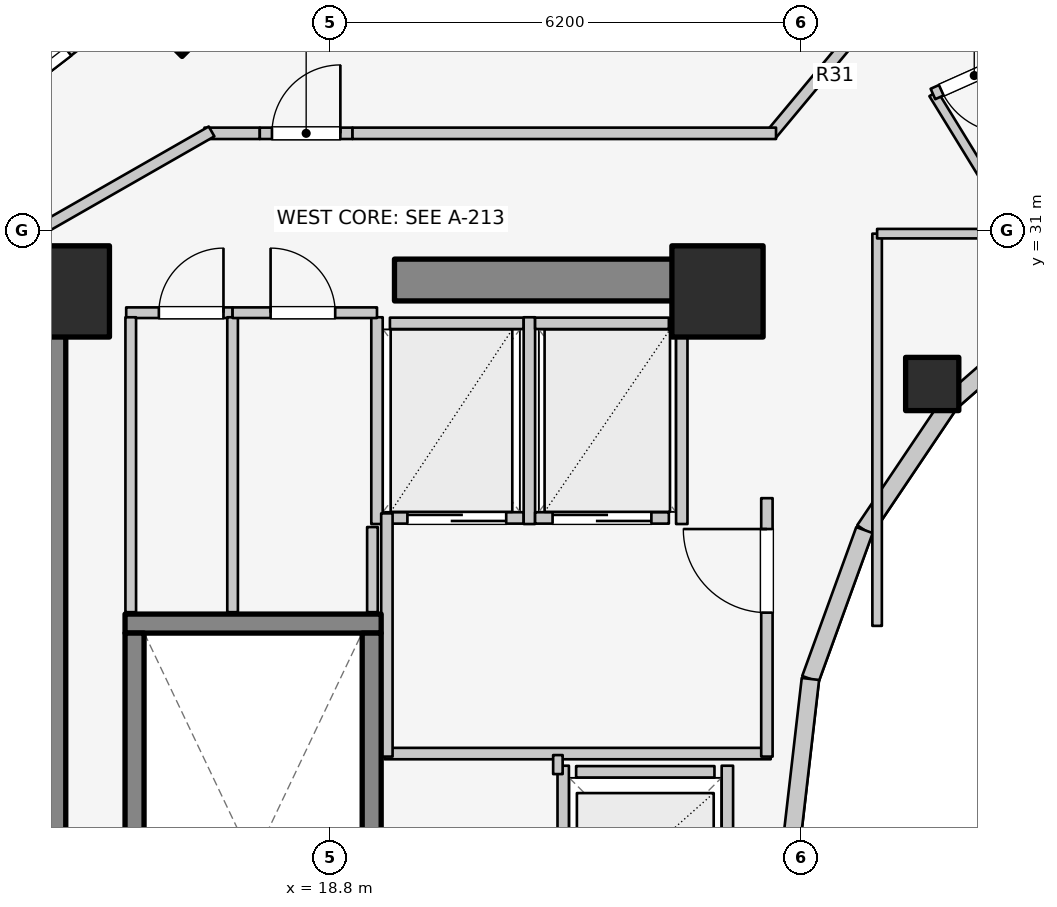
"""IFC4 building model, lengths in metres.
Left out: names, types, materials, properties, quantities, classifications, styles, units other than length and angle.
Written with IfcOpenShell. Run it as: python <this file> out.ifc"""

import sys

from ifc_helpers import new_model, si_unit, direction, frame, frame_2d, origin, origin_2d, place, context, subcontext, project, spatial, rectangle, extrude, element, fill, save


model = new_model("IFC4")
c1 = context("Model", 3, precision=1e-05, world=origin(), true_north=direction((0.0, 1.0)))
c2 = subcontext(c1, "Body", "Model", "MODEL_VIEW")
j1 = project(units=[si_unit("LENGTHUNIT", "METRE"), si_unit("PLANEANGLEUNIT", "RADIAN")], contexts=[c1])
p1 = place(None, origin())
s1 = spatial("IfcSite", under=j1, at=p1, CompositionType="ELEMENT")
p2 = place(p1, origin())
s2 = spatial("IfcBuilding", under=s1, at=p2, CompositionType="ELEMENT")
p3 = place(p2, frame((0.0, 0.0, 217.1)))
s3 = spatial("IfcBuildingStorey", under=s2, at=p3, CompositionType="ELEMENT", Elevation=217.1)
p4 = place(p3, frame((15.05, 17.05, 0.0), z_axis=(0.0, 0.0, 1.0), x_axis=(0.0, 1.0, 0.0)))
e1 = element("IfcWall", 1, at=p4, inside=s3, PredefinedType="SHEAR", context=c2, shape_type="SweptSolid", body=[
    extrude(rectangle(XDim=12.8, YDim=0.55, at=frame_2d((6.4, 0.0))), origin(), (0.0, 0.0, 1.0), 3.1),
])
p5 = place(p3, frame((19.65, 30.35, 0.0), z_axis=(0.0, 0.0, 1.0), x_axis=(1.0, 0.0, 0.0)))
e2 = element("IfcWall", 2, at=p5, inside=s3, PredefinedType="SHEAR", context=c2, shape_type="SweptSolid", body=[
    extrude(rectangle(XDim=4.5, YDim=0.55, at=frame_2d((2.25, 0.0))), origin(), (0.0, 0.0, 1.0), 3.1),
])
p6 = place(p3, frame((16.105, 25.83, 0.0), z_axis=(0.0, 0.0, 1.0), x_axis=(1.0, 0.0, 0.0)))
e3 = element("IfcWall", 3, at=p6, inside=s3, PredefinedType="SOLIDWALL", context=c2, shape_type="SweptSolid", body=[
    extrude(rectangle(XDim=3.37, YDim=0.25, at=frame_2d((1.685, 0.0))), origin(), (0.0, 0.0, 1.0), 3.1),
])
for number, where, z_axis, x_axis in (
    (4, (16.23, 17.895, 0.0), (0.0, 0.0, 1.0), (0.0, 1.0, 0.0)),
    (5, (19.35, 17.895, 0.0), (0.0, 0.0, 1.0), (0.0, 1.0, 0.0)),
):
    element("IfcWall", number, at=place(p3, frame(where, z_axis=z_axis, x_axis=x_axis)), inside=s3, PredefinedType="SOLIDWALL", context=c2, shape_type="SweptSolid", body=[
        extrude(rectangle(XDim=7.81, YDim=0.25, at=frame_2d((3.905, 0.0))), origin(), (0.0, 0.0, 1.0), 3.1),
    ])
for number, where, z_axis, x_axis in (
    (6, (23.9, 30.2, 0.0), (0.0, 0.0, 1.0), (1.0, 0.0, 0.0)),
    (7, (15.3, 30.2, 0.0), (0.0, 0.0, 1.0), (1.0, 0.0, 0.0)),
):
    element("IfcColumn", number, at=place(p3, frame(where, z_axis=z_axis, x_axis=x_axis)), inside=s3, PredefinedType="COLUMN", context=c2, shape_type="SweptSolid", body=[
        extrude(rectangle(XDim=1.2, YDim=1.2, at=origin_2d()), origin(), (0.0, 0.0, 1.0), 3.1),
    ])
p7 = place(p3, frame((26.725, 28.982, 0.0), z_axis=(0.0, 0.0, 1.0), x_axis=(1.0, 0.0, 0.0)))
e8 = element("IfcColumn", 8, at=p7, inside=s3, PredefinedType="COLUMN", context=c2, shape_type="SweptSolid", body=[
    extrude(rectangle(XDim=0.7, YDim=0.7, at=origin_2d()), origin(), (0.0, 0.0, 1.0), 3.1),
])
p8 = place(p3, frame((16.855, 33.857, 0.0), z_axis=(0.0, 0.0, 1.0), x_axis=(-0.707106781187, 0.707106781187, 0.0)))
e9 = element("IfcColumn", 9, at=p8, inside=s3, PredefinedType="COLUMN", context=c2, shape_type="SweptSolid", body=[
    extrude(rectangle(XDim=0.8, YDim=0.8, at=origin_2d()), origin(), (0.0, 0.0, 1.0), 3.1),
])
p9 = place(p3, frame((28.44, 30.032, 0.0), z_axis=(0.0, 0.0, 1.0), x_axis=(-0.752576694707, -0.658504607869, 0.0)))
e10 = element("IfcWall", 10, at=p9, inside=s3, PredefinedType="STANDARD", context=c2, shape_type="SweptSolid", body=[
    extrude(rectangle(XDim=1.959, YDim=0.23, at=frame_2d((0.98, 0.0))), origin(), (0.0, 0.0, 1.0), 1.22),
])
p10 = place(p3, frame((26.965, 28.742, 0.0), z_axis=(0.0, 0.0, 1.0), x_axis=(-0.558197800898, -0.829707909492, 0.0)))
e11 = element("IfcWall", 11, at=p10, inside=s3, PredefinedType="STANDARD", context=c2, shape_type="SweptSolid", body=[
    extrude(rectangle(XDim=2.027, YDim=0.23, at=frame_2d((1.013, 0.0))), origin(), (0.0, 0.0, 1.0), 1.22),
])
p11 = place(p3, frame((25.834, 27.06, 0.0), z_axis=(0.0, 0.0, 1.0), x_axis=(-0.341423187295, -0.93990968033, 0.0)))
e12 = element("IfcWall", 12, at=p11, inside=s3, PredefinedType="STANDARD", context=c2, shape_type="SweptSolid", body=[
    extrude(rectangle(XDim=2.084, YDim=0.23, at=frame_2d((1.042, 0.0))), origin(), (0.0, 0.0, 1.0), 2.56),
])
p12 = place(p3, frame((25.123, 25.102, 0.0), z_axis=(0.0, 0.0, 1.0), x_axis=(-0.114711713601, -0.993398823617, 0.0)))
e13 = element("IfcWall", 13, at=p12, inside=s3, PredefinedType="STANDARD", context=c2, shape_type="SweptSolid", body=[
    extrude(rectangle(XDim=2.115, YDim=0.23, at=frame_2d((1.058, 0.0))), origin(), (0.0, 0.0, 1.0), 2.56),
])
p13 = place(p3, frame((16.442, 34.272, 0.0), z_axis=(0.0, 0.0, 1.0), x_axis=(-0.792713817907, -0.609593965603, 0.0)))
e14 = element("IfcWall", 14, at=p13, inside=s3, PredefinedType="STANDARD", context=c2, shape_type="SweptSolid", body=[
    extrude(rectangle(XDim=4.041, YDim=0.26, at=frame_2d((2.021, 0.0))), origin(), (0.0, 0.0, 1.0), 1.22),
])
p14 = place(p13, frame((1.42, 0.0, 0.15)))
e15 = element("IfcOpeningElement", 15, at=p14, cuts=e14, PredefinedType="OPENING", context=c2, shape_type="SweptSolid", body=[
    extrude(rectangle(XDim=1.2, YDim=0.9, at=frame_2d((0.6, 0.45))), frame((0.0, 0.14, 0.0), z_axis=(0.0, -1.0, 0.0), x_axis=(1.0, 0.0, 0.0)), (0.0, 0.0, 1.0), 0.28),
])
p15 = place(p3, frame((22.04, 23.88, 0.0), z_axis=(0.0, 0.0, 1.0), x_axis=(1.0, 0.0, 0.0)))
e16 = element("IfcWall", 16, at=p15, inside=s3, PredefinedType="SOLIDWALL", context=c2, shape_type="SweptSolid", body=[
    extrude(rectangle(XDim=1.82, YDim=0.15, at=frame_2d((0.91, 0.0))), origin(), (0.0, 0.0, 1.0), 2.12),
])
p16 = place(p3, frame((21.87, 21.64, 0.0), z_axis=(0.0, 0.0, 1.0), x_axis=(0.0, 1.0, 0.0)))
e17 = element("IfcWall", 17, at=p16, inside=s3, PredefinedType="SOLIDWALL", context=c2, shape_type="SweptSolid", body=[
    extrude(rectangle(XDim=2.32, YDim=0.15, at=frame_2d((1.16, 0.0))), origin(), (0.0, 0.0, 1.0), 2.575),
])
p17 = place(p3, frame((24.03, 21.64, 0.0), z_axis=(0.0, 0.0, 1.0), x_axis=(0.0, 1.0, 0.0)))
e18 = element("IfcWall", 18, at=p17, inside=s3, PredefinedType="SOLIDWALL", context=c2, shape_type="SweptSolid", body=[
    extrude(rectangle(XDim=2.32, YDim=0.15, at=frame_2d((1.16, 0.0))), origin(), (0.0, 0.0, 1.0), 2.12),
])
p18 = place(p3, frame((19.59, 27.22, 0.0), z_axis=(0.0, 0.0, 1.0), x_axis=(1.0, 0.0, 0.0)))
e19 = element("IfcWall", 19, at=p18, inside=s3, PredefinedType="SOLIDWALL", context=c2, shape_type="SweptSolid", body=[
    extrude(rectangle(XDim=1.76, YDim=0.15, at=frame_2d((0.88, 0.0))), origin(), (0.0, 0.0, 1.0), 2.575),
])
p19 = place(p18, frame((0.23, 0.0, 0.0)))
e20 = element("IfcOpeningElement", 20, at=p19, cuts=e19, PredefinedType="OPENING", context=c2, shape_type="SweptSolid", body=[
    extrude(rectangle(XDim=1.3, YDim=2.1, at=frame_2d((0.65, 1.05))), frame((0.0, 0.085, 0.0), z_axis=(0.0, -1.0, 0.0), x_axis=(1.0, 0.0, 0.0)), (0.0, 0.0, 1.0), 0.17),
])
p20 = place(p3, frame((19.59, 29.78, 0.0), z_axis=(0.0, 0.0, 1.0), x_axis=(1.0, 0.0, 0.0)))
e21 = element("IfcWall", 21, at=p20, inside=s3, PredefinedType="SOLIDWALL", context=c2, shape_type="SweptSolid", body=[
    extrude(rectangle(XDim=1.76, YDim=0.15, at=frame_2d((0.88, 0.0))), origin(), (0.0, 0.0, 1.0), 2.575),
])
for number, where, z_axis, x_axis in (
    (22, (19.42, 27.14, 0.0), (0.0, 0.0, 1.0), (0.0, 1.0, 0.0)),
    (23, (21.425, 27.14, 0.0), (0.0, 0.0, 1.0), (0.0, 1.0, 0.0)),
):
    element("IfcWall", number, at=place(p3, frame(where, z_axis=z_axis, x_axis=x_axis)), inside=s3, PredefinedType="SOLIDWALL", context=c2, shape_type="SweptSolid", body=[
        extrude(rectangle(XDim=2.72, YDim=0.15, at=frame_2d((1.36, 0.0))), origin(), (0.0, 0.0, 1.0), 2.575),
    ])
p21 = place(p3, frame((21.5, 27.22, 0.0), z_axis=(0.0, 0.0, 1.0), x_axis=(1.0, 0.0, 0.0)))
e24 = element("IfcWall", 24, at=p21, inside=s3, PredefinedType="SOLIDWALL", context=c2, shape_type="SweptSolid", body=[
    extrude(rectangle(XDim=1.76, YDim=0.15, at=frame_2d((0.88, 0.0))), origin(), (0.0, 0.0, 1.0), 2.575),
])
p22 = place(p21, frame((0.23, 0.0, 0.0)))
e25 = element("IfcOpeningElement", 25, at=p22, cuts=e24, PredefinedType="OPENING", context=c2, shape_type="SweptSolid", body=[
    extrude(rectangle(XDim=1.3, YDim=2.1, at=frame_2d((0.65, 1.05))), frame((0.0, 0.085, 0.0), z_axis=(0.0, -1.0, 0.0), x_axis=(1.0, 0.0, 0.0)), (0.0, 0.0, 1.0), 0.17),
])
p23 = place(p3, frame((21.5, 29.78, 0.0), z_axis=(0.0, 0.0, 1.0), x_axis=(1.0, 0.0, 0.0)))
e26 = element("IfcWall", 26, at=p23, inside=s3, PredefinedType="SOLIDWALL", context=c2, shape_type="SweptSolid", body=[
    extrude(rectangle(XDim=1.76, YDim=0.15, at=frame_2d((0.88, 0.0))), origin(), (0.0, 0.0, 1.0), 2.575),
])
p24 = place(p3, frame((23.43, 27.14, 0.0), z_axis=(0.0, 0.0, 1.0), x_axis=(0.0, 1.0, 0.0)))
e27 = element("IfcWall", 27, at=p24, inside=s3, PredefinedType="SOLIDWALL", context=c2, shape_type="SweptSolid", body=[
    extrude(rectangle(XDim=2.72, YDim=0.15, at=frame_2d((1.36, 0.0))), origin(), (0.0, 0.0, 1.0), 2.575),
])
p25 = place(p3, frame((19.52, 24.12, 0.0), z_axis=(0.0, 0.0, 1.0), x_axis=(1.0, 0.0, 0.0)))
e28 = element("IfcWall", 28, at=p25, inside=s3, PredefinedType="PARTITIONING", context=c2, shape_type="SweptSolid", body=[
    extrude(rectangle(XDim=5.08, YDim=0.15, at=frame_2d((2.54, 0.0))), origin(), (0.0, 0.0, 1.0), 2.12),
])
p26 = place(p3, frame((19.55, 24.08, 0.0), z_axis=(0.0, 0.0, 1.0), x_axis=(0.0, 1.0, 0.0)))
e29 = element("IfcWall", 29, at=p26, inside=s3, PredefinedType="PARTITIONING", context=c2, shape_type="SweptSolid", body=[
    extrude(rectangle(XDim=3.2, YDim=0.15, at=frame_2d((1.6, 0.0))), origin(), (0.0, 0.0, 1.0), 2.575),
])
p27 = place(p3, frame((24.55, 24.08, 0.0), z_axis=(0.0, 0.0, 1.0), x_axis=(0.0, 1.0, 0.0)))
e30 = element("IfcWall", 30, at=p27, inside=s3, PredefinedType="PARTITIONING", context=c2, shape_type="SweptSolid", body=[
    extrude(rectangle(XDim=3.4, YDim=0.15, at=frame_2d((1.7, 0.0))), origin(), (0.0, 0.0, 1.0), 2.575),
])
p28 = place(p27, frame((1.894, 0.0, 0.0)))
e31 = element("IfcOpeningElement", 31, at=p28, cuts=e30, PredefinedType="OPENING", context=c2, shape_type="SweptSolid", body=[
    extrude(rectangle(XDim=1.1, YDim=2.1, at=frame_2d((0.55, 1.05))), frame((0.0, 0.085, 0.0), z_axis=(0.0, -1.0, 0.0), x_axis=(1.0, 0.0, 0.0)), (0.0, 0.0, 1.0), 0.17),
])
p29 = place(p3, frame((21.8, 23.85, 0.0), z_axis=(0.0, 0.0, 1.0), x_axis=(0.0, 1.0, 0.0)))
e32 = element("IfcWall", 32, at=p29, inside=s3, PredefinedType="PARTITIONING", context=c2, shape_type="SweptSolid", body=[
    extrude(rectangle(XDim=0.25, YDim=0.125, at=frame_2d((0.125, 0.0))), origin(), (0.0, 0.0, 1.0), 2.575),
])
p30 = place(p3, frame((16.12, 29.92, 0.0), z_axis=(0.0, 0.0, 1.0), x_axis=(1.0, 0.0, 0.0)))
e33 = element("IfcWall", 33, at=p30, inside=s3, PredefinedType="PLUMBINGWALL", context=c2, shape_type="SweptSolid", body=[
    extrude(rectangle(XDim=1.4, YDim=0.14, at=frame_2d((0.7, 0.0))), origin(), (0.0, 0.0, 1.0), 2.575),
])
p31 = place(p30, frame((0.43, 0.0, 0.0)))
e34 = element("IfcOpeningElement", 34, at=p31, cuts=e33, PredefinedType="OPENING", context=c2, shape_type="SweptSolid", body=[
    extrude(rectangle(XDim=0.85, YDim=2.05, at=frame_2d((0.425, 1.025))), frame((0.0, 0.08, 0.0), z_axis=(0.0, -1.0, 0.0), x_axis=(1.0, 0.0, 0.0)), (0.0, 0.0, 1.0), 0.16),
])
for number, where, z_axis, x_axis in (
    (35, (16.18, 25.98, 0.0), (0.0, 0.0, 1.0), (0.0, 1.0, 0.0)),
    (36, (17.52, 25.98, 0.0), (0.0, 0.0, 1.0), (0.0, 1.0, 0.0)),
):
    element("IfcWall", number, at=place(p3, frame(where, z_axis=z_axis, x_axis=x_axis)), inside=s3, PredefinedType="PLUMBINGWALL", context=c2, shape_type="SweptSolid", body=[
        extrude(rectangle(XDim=3.88, YDim=0.14, at=frame_2d((1.94, 0.0))), origin(), (0.0, 0.0, 1.0), 2.575),
    ])
p32 = place(p3, frame((17.52, 29.92, 0.0), z_axis=(0.0, 0.0, 1.0), x_axis=(1.0, 0.0, 0.0)))
e37 = element("IfcWall", 37, at=p32, inside=s3, PredefinedType="PLUMBINGWALL", context=c2, shape_type="SweptSolid", body=[
    extrude(rectangle(XDim=1.9, YDim=0.14, at=frame_2d((0.95, 0.0))), origin(), (0.0, 0.0, 1.0), 2.575),
])
p33 = place(p32, frame((0.5, 0.0, 0.0)))
e38 = element("IfcOpeningElement", 38, at=p33, cuts=e37, PredefinedType="OPENING", context=c2, shape_type="SweptSolid", body=[
    extrude(rectangle(XDim=0.85, YDim=2.05, at=frame_2d((0.425, 1.025))), frame((0.0, 0.08, 0.0), z_axis=(0.0, -1.0, 0.0), x_axis=(1.0, 0.0, 0.0)), (0.0, 0.0, 1.0), 0.16),
])
p34 = place(p3, frame((19.36, 25.98, 0.0), z_axis=(0.0, 0.0, 1.0), x_axis=(0.0, 1.0, 0.0)))
e39 = element("IfcWall", 39, at=p34, inside=s3, PredefinedType="PLUMBINGWALL", context=c2, shape_type="SweptSolid", body=[
    extrude(rectangle(XDim=1.12, YDim=0.14, at=frame_2d((0.56, 0.0))), origin(), (0.0, 0.0, 1.0), 2.575),
])
p35 = place(p3, frame((28.45, 30.015, 0.0), z_axis=(0.0, 0.0, 1.0), x_axis=(-0.522763432117, 0.852477796802, 0.0)))
e40 = element("IfcWall", 40, at=p35, inside=s3, PredefinedType="PARTITIONING", context=c2, shape_type="SweptSolid", body=[
    extrude(rectangle(XDim=3.269, YDim=0.125, at=frame_2d((1.635, 0.0))), origin(), (0.0, 0.0, 1.0), 1.22),
])
p36 = place(p3, frame((27.858, 33.299, 0.0), z_axis=(0.0, 0.0, 1.0), x_axis=(-0.91321306925, -0.407482380172, 0.0)))
e41 = element("IfcWall", 41, at=p36, inside=s3, PredefinedType="PARTITIONING", context=c2, shape_type="SweptSolid", body=[
    extrude(rectangle(XDim=1.23, YDim=0.15, at=frame_2d((0.615, 0.0))), origin(), (0.0, 0.0, 1.0), 2.16),
])
p37 = place(p36, frame((0.16, 0.0, 0.0)))
e42 = element("IfcOpeningElement", 42, at=p37, cuts=e41, PredefinedType="OPENING", context=c2, shape_type="SweptSolid", body=[
    extrude(rectangle(XDim=0.95, YDim=2.1, at=frame_2d((0.475, 1.05))), frame((0.0, 0.085, 0.0), z_axis=(0.0, -1.0, 0.0), x_axis=(1.0, 0.0, 0.0)), (0.0, 0.0, 1.0), 0.17),
])
p38 = place(p3, frame((26.0, 25.8, 0.0), z_axis=(0.0, 0.0, 1.0), x_axis=(0.0, 1.0, 0.0)))
e43 = element("IfcWall", 43, at=p38, inside=s3, PredefinedType="PARTITIONING", context=c2, shape_type="SweptSolid", body=[
    extrude(rectangle(XDim=5.16, YDim=0.125, at=frame_2d((2.58, 0.0))), origin(), (0.0, 0.0, 1.0), 1.952),
])
p39 = place(p3, frame((26.0, 30.96, 0.0), z_axis=(0.0, 0.0, 1.0), x_axis=(1.0, 0.0, 0.0)))
e44 = element("IfcWall", 44, at=p39, inside=s3, PredefinedType="PARTITIONING", context=c2, shape_type="SweptSolid", body=[
    extrude(rectangle(XDim=2.6, YDim=0.125, at=frame_2d((1.3, 0.0))), origin(), (0.0, 0.0, 1.0), 1.22),
])
p40 = place(p3, frame((26.016, 33.955, 0.0), z_axis=(0.0, 0.0, 1.0), x_axis=(-0.64030392053, -0.76812166312, 0.0)))
e45 = element("IfcWall", 45, at=p40, inside=s3, PredefinedType="PARTITIONING", context=c2, shape_type="SweptSolid", body=[
    extrude(rectangle(XDim=2.21, YDim=0.15, at=frame_2d((1.105, 0.0))), origin(), (0.0, 0.0, 1.0), 1.22),
])
p41 = place(p3, frame((17.15, 32.28, 0.0), z_axis=(0.0, 0.0, 1.0), x_axis=(1.0, 0.0, 0.0)))
e46 = element("IfcWall", 46, at=p41, inside=s3, PredefinedType="PARTITIONING", context=c2, shape_type="SweptSolid", body=[
    extrude(rectangle(XDim=0.728, YDim=0.15, at=frame_2d((0.364, 0.0))), origin(), (0.0, 0.0, 1.0), 2.575),
])
p42 = place(p3, frame((17.878, 32.28, 0.0), z_axis=(0.0, 0.0, 1.0), x_axis=(1.0, 0.0, 0.0)))
e47 = element("IfcWall", 47, at=p42, inside=s3, PredefinedType="PARTITIONING", context=c2, shape_type="SweptSolid", body=[
    extrude(rectangle(XDim=1.22, YDim=0.15, at=frame_2d((0.61, 0.0))), origin(), (0.0, 0.0, 1.0), 2.16),
])
p43 = place(p42, frame((0.16, 0.0, 0.0)))
e48 = element("IfcOpeningElement", 48, at=p43, cuts=e47, PredefinedType="OPENING", context=c2, shape_type="SweptSolid", body=[
    extrude(rectangle(XDim=0.9, YDim=2.1, at=frame_2d((0.45, 1.05))), frame((0.0, 0.085, 0.0), z_axis=(0.0, -1.0, 0.0), x_axis=(1.0, 0.0, 0.0)), (0.0, 0.0, 1.0), 0.17),
])
p44 = place(p3, frame((19.098, 32.28, 0.0), z_axis=(0.0, 0.0, 1.0), x_axis=(1.0, 0.0, 0.0)))
e49 = element("IfcWall", 49, at=p44, inside=s3, PredefinedType="PARTITIONING", context=c2, shape_type="SweptSolid", body=[
    extrude(rectangle(XDim=5.572, YDim=0.15, at=frame_2d((2.786, 0.0))), origin(), (0.0, 0.0, 1.0), 1.22),
])
p45 = place(p3, frame((17.243, 32.305, 0.0), z_axis=(0.0, 0.0, 1.0), x_axis=(-0.867991349648, -0.496579315857, 0.0)))
e50 = element("IfcWall", 50, at=p45, inside=s3, PredefinedType="PARTITIONING", context=c2, shape_type="SweptSolid", body=[
    extrude(rectangle(XDim=2.567, YDim=0.15, at=frame_2d((1.283, 0.0))), origin(), (0.0, 0.0, 1.0), 1.22),
])
p46 = place(p14, origin())
e51 = element("IfcWindow", 51, at=p46, inside=s3, PartitioningType="SINGLE_PANEL", PredefinedType="WINDOW", context=c2, shape_type="SweptSolid", body=[
    extrude(rectangle(XDim=1.2, YDim=0.9, at=frame_2d((0.6, 0.45))), frame((0.0, 0.03, 0.0), z_axis=(0.0, -1.0, 0.0), x_axis=(1.0, 0.0, 0.0)), (0.0, 0.0, 1.0), 0.06),
])
fill(e15, e51)
p47 = place(p19, origin())
e52 = element("IfcDoor", 52, at=p47, inside=s3, OperationType="DOUBLE_DOOR_SLIDING", PredefinedType="DOOR", context=c2, shape_type="SweptSolid", body=[
    extrude(rectangle(XDim=1.3, YDim=2.1, at=frame_2d((0.65, 1.05))), frame((0.0, 0.025, 0.0), z_axis=(0.0, -1.0, 0.0), x_axis=(1.0, 0.0, 0.0)), (0.0, 0.0, 1.0), 0.05),
])
fill(e20, e52)
p48 = place(p22, origin())
e53 = element("IfcDoor", 53, at=p48, inside=s3, OperationType="DOUBLE_DOOR_SLIDING", PredefinedType="DOOR", context=c2, shape_type="SweptSolid", body=[
    extrude(rectangle(XDim=1.3, YDim=2.1, at=frame_2d((0.65, 1.05))), frame((0.0, 0.025, 0.0), z_axis=(0.0, -1.0, 0.0), x_axis=(1.0, 0.0, 0.0)), (0.0, 0.0, 1.0), 0.05),
])
fill(e25, e53)
p49 = place(p28, origin())
e54 = element("IfcDoor", 54, at=p49, inside=s3, OperationType="SINGLE_SWING_RIGHT", PredefinedType="DOOR", context=c2, shape_type="SweptSolid", body=[
    extrude(rectangle(XDim=1.1, YDim=2.1, at=frame_2d((0.55, 1.05))), frame((0.0, 0.025, 0.0), z_axis=(0.0, -1.0, 0.0), x_axis=(1.0, 0.0, 0.0)), (0.0, 0.0, 1.0), 0.05),
])
fill(e31, e54)
p50 = place(p31, origin())
e55 = element("IfcDoor", 55, at=p50, inside=s3, OperationType="SINGLE_SWING_RIGHT", PredefinedType="DOOR", context=c2, shape_type="SweptSolid", body=[
    extrude(rectangle(XDim=0.85, YDim=2.05, at=frame_2d((0.425, 1.025))), frame((0.0, 0.025, 0.0), z_axis=(0.0, -1.0, 0.0), x_axis=(1.0, 0.0, 0.0)), (0.0, 0.0, 1.0), 0.05),
])
fill(e34, e55)
p51 = place(p33, origin())
e56 = element("IfcDoor", 56, at=p51, inside=s3, OperationType="SINGLE_SWING_LEFT", PredefinedType="DOOR", context=c2, shape_type="SweptSolid", body=[
    extrude(rectangle(XDim=0.85, YDim=2.05, at=frame_2d((0.425, 1.025))), frame((0.0, 0.025, 0.0), z_axis=(0.0, -1.0, 0.0), x_axis=(1.0, 0.0, 0.0)), (0.0, 0.0, 1.0), 0.05),
])
fill(e38, e56)
p52 = place(p37, origin())
e57 = element("IfcDoor", 57, at=p52, inside=s3, OperationType="SINGLE_SWING_LEFT", PredefinedType="DOOR", context=c2, shape_type="SweptSolid", body=[
    extrude(rectangle(XDim=0.95, YDim=2.1, at=frame_2d((0.475, 1.05))), frame((0.0, 0.025, 0.0), z_axis=(0.0, -1.0, 0.0), x_axis=(1.0, 0.0, 0.0)), (0.0, 0.0, 1.0), 0.05),
])
fill(e42, e57)
p53 = place(p43, origin())
e58 = element("IfcDoor", 58, at=p53, inside=s3, OperationType="SINGLE_SWING_RIGHT", PredefinedType="DOOR", context=c2, shape_type="SweptSolid", body=[
    extrude(rectangle(XDim=0.9, YDim=2.1, at=frame_2d((0.45, 1.05))), frame((0.0, 0.025, 0.0), z_axis=(0.0, -1.0, 0.0), x_axis=(1.0, 0.0, 0.0)), (0.0, 0.0, 1.0), 0.05),
])
fill(e48, e58)
save(model, sys.argv[1])
